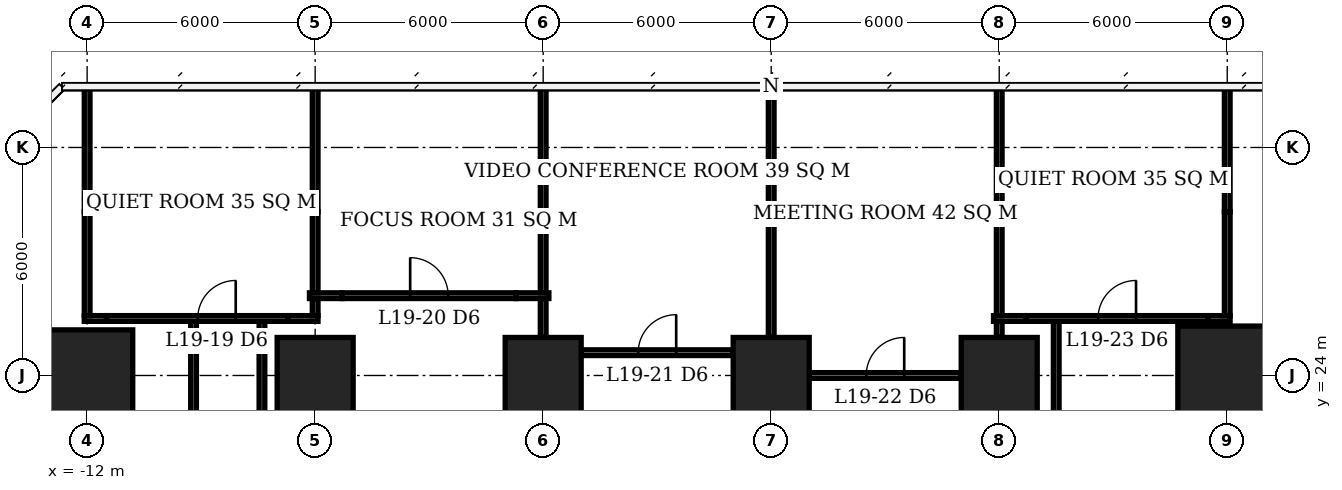
"""IFC4 building model, lengths in metres.
Left out: names, types, materials, properties, quantities, classifications, styles, units other than length and angle.
Written with IfcOpenShell. Run it as: python <this file> out.ifc"""

import sys

from ifc_helpers import new_model, si_unit, direction, frame, frame_2d, origin, origin_2d, place, context, subcontext, project, spatial, rectangle, extrude, element, fill, save


model = new_model("IFC4")
c1 = context("Model", 3, precision=1e-05, world=origin(), true_north=direction((0.0, 1.0)))
c2 = subcontext(c1, "Body", "Model", "MODEL_VIEW")
j1 = project(units=[si_unit("LENGTHUNIT", "METRE"), si_unit("PLANEANGLEUNIT", "RADIAN")], contexts=[c1])
p1 = place(None, origin())
s1 = spatial("IfcSite", under=j1, at=p1, CompositionType="ELEMENT")
p2 = place(p1, origin())
s2 = spatial("IfcBuilding", under=s1, at=p2, CompositionType="ELEMENT")
p3 = place(p2, frame((0.0, 0.0, 80.6)))
s3 = spatial("IfcBuildingStorey", under=s2, at=p3, CompositionType="ELEMENT", Elevation=80.6)
p4 = place(p3, frame((-12.0, 24.0, 0.0), z_axis=(0.0, 0.0, 1.0), x_axis=(1.0, 0.0, 0.0)))
e1 = element("IfcColumn", 1, at=p4, inside=s3, PredefinedType="COLUMN", context=c2, shape_type="SweptSolid", body=[
    extrude(rectangle(XDim=2.4, YDim=2.4, at=origin_2d()), origin(), (0.0, 0.0, 1.0), 3.9),
])
for number, where, z_axis, x_axis in (
    (2, (-6.0, 24.0, 0.0), (0.0, 0.0, 1.0), (1.0, 0.0, 0.0)),
    (3, (0.0, 24.0, 0.0), (0.0, 0.0, 1.0), (1.0, 0.0, 0.0)),
    (4, (6.0, 24.0, 0.0), (0.0, 0.0, 1.0), (1.0, 0.0, 0.0)),
    (5, (12.0, 24.0, 0.0), (0.0, 0.0, 1.0), (1.0, 0.0, 0.0)),
):
    element("IfcColumn", number, at=place(p3, frame(where, z_axis=z_axis, x_axis=x_axis)), inside=s3, PredefinedType="COLUMN", context=c2, shape_type="SweptSolid", body=[
        extrude(rectangle(XDim=2.0, YDim=2.0, at=origin_2d()), origin(), (0.0, 0.0, 1.0), 3.9),
    ])
p5 = place(p3, frame((18.0, 24.0, 0.0), z_axis=(0.0, 0.0, 1.0), x_axis=(1.0, 0.0, 0.0)))
e6 = element("IfcColumn", 6, at=p5, inside=s3, PredefinedType="COLUMN", context=c2, shape_type="SweptSolid", body=[
    extrude(rectangle(XDim=2.6, YDim=2.6, at=origin_2d()), origin(), (0.0, 0.0, 1.0), 3.9),
])
p6 = place(p3, frame((7.0, 24.0, 0.0), z_axis=(0.0, 0.0, 1.0), x_axis=(1.0, 0.0, 0.0)))
e7 = element("IfcWall", 7, at=p6, inside=s3, PredefinedType="PARTITIONING", context=c2, shape_type="SweptSolid", body=[
    extrude(rectangle(XDim=4.0, YDim=0.15, at=frame_2d((2.0, 0.0))), origin(), (0.0, 0.0, 1.0), 3.65),
])
p7 = place(p6, frame((1.5, 0.0, 0.0)))
e8 = element("IfcOpeningElement", 8, at=p7, cuts=e7, PredefinedType="OPENING", context=c2, shape_type="SweptSolid", body=[
    extrude(rectangle(XDim=1.0, YDim=2.1, at=frame_2d((0.5, 1.05))), frame((0.0, 0.085, 0.0), z_axis=(0.0, -1.0, 0.0), x_axis=(1.0, 0.0, 0.0)), (0.0, 0.0, 1.0), 0.17),
])
p8 = place(p3, frame((1.0, 24.6, 0.0), z_axis=(0.0, 0.0, 1.0), x_axis=(1.0, 0.0, 0.0)))
e9 = element("IfcWall", 9, at=p8, inside=s3, PredefinedType="PARTITIONING", context=c2, shape_type="SweptSolid", body=[
    extrude(rectangle(XDim=4.0, YDim=0.15, at=frame_2d((2.0, 0.0))), origin(), (0.0, 0.0, 1.0), 3.65),
])
p9 = place(p8, frame((1.5, 0.0, 0.0)))
e10 = element("IfcOpeningElement", 10, at=p9, cuts=e9, PredefinedType="OPENING", context=c2, shape_type="SweptSolid", body=[
    extrude(rectangle(XDim=1.0, YDim=2.1, at=frame_2d((0.5, 1.05))), frame((0.0, 0.085, 0.0), z_axis=(0.0, -1.0, 0.0), x_axis=(1.0, 0.0, 0.0)), (0.0, 0.0, 1.0), 0.17),
])
p10 = place(p3, frame((-12.075, 25.5, 0.0), z_axis=(0.0, 0.0, 1.0), x_axis=(1.0, 0.0, 0.0)))
e11 = element("IfcWall", 11, at=p10, inside=s3, PredefinedType="PARTITIONING", context=c2, shape_type="SweptSolid", body=[
    extrude(rectangle(XDim=0.585, YDim=0.15, at=frame_2d((0.292, 0.0))), origin(), (0.0, 0.0, 1.0), 2.65),
])
p11 = place(p3, frame((-11.49, 25.5, 0.0), z_axis=(0.0, 0.0, 1.0), x_axis=(1.0, 0.0, 0.0)))
e12 = element("IfcWall", 12, at=p11, inside=s3, PredefinedType="PARTITIONING", context=c2, shape_type="SweptSolid", body=[
    extrude(rectangle(XDim=4.78, YDim=0.15, at=frame_2d((2.39, 0.0))), origin(), (0.0, 0.0, 1.0), 3.65),
])
p12 = place(p11, frame((2.4, 0.0, 0.0)))
e13 = element("IfcOpeningElement", 13, at=p12, cuts=e12, PredefinedType="OPENING", context=c2, shape_type="SweptSolid", body=[
    extrude(rectangle(XDim=1.0, YDim=2.1, at=frame_2d((0.5, 1.05))), frame((0.0, 0.085, 0.0), z_axis=(0.0, -1.0, 0.0), x_axis=(1.0, 0.0, 0.0)), (0.0, 0.0, 1.0), 0.17),
])
p13 = place(p3, frame((-6.71, 25.5, 0.0), z_axis=(0.0, 0.0, 1.0), x_axis=(1.0, 0.0, 0.0)))
e14 = element("IfcWall", 14, at=p13, inside=s3, PredefinedType="PARTITIONING", context=c2, shape_type="SweptSolid", body=[
    extrude(rectangle(XDim=0.785, YDim=0.15, at=frame_2d((0.393, 0.0))), origin(), (0.0, 0.0, 1.0), 2.65),
])
p14 = place(p3, frame((11.85, 25.5, 0.0), z_axis=(0.0, 0.0, 1.0), x_axis=(1.0, 0.0, 0.0)))
e15 = element("IfcWall", 15, at=p14, inside=s3, PredefinedType="PARTITIONING", context=c2, shape_type="SweptSolid", body=[
    extrude(rectangle(XDim=0.86, YDim=0.15, at=frame_2d((0.43, 0.0))), origin(), (0.0, 0.0, 1.0), 2.65),
])
p15 = place(p3, frame((12.71, 25.5, 0.0), z_axis=(0.0, 0.0, 1.0), x_axis=(1.0, 0.0, 0.0)))
e16 = element("IfcWall", 16, at=p15, inside=s3, PredefinedType="PARTITIONING", context=c2, shape_type="SweptSolid", body=[
    extrude(rectangle(XDim=4.78, YDim=0.15, at=frame_2d((2.39, 0.0))), origin(), (0.0, 0.0, 1.0), 3.65),
])
p16 = place(p15, frame((1.89, 0.0, 0.0)))
e17 = element("IfcOpeningElement", 17, at=p16, cuts=e16, PredefinedType="OPENING", context=c2, shape_type="SweptSolid", body=[
    extrude(rectangle(XDim=1.0, YDim=2.1, at=frame_2d((0.5, 1.05))), frame((0.0, 0.085, 0.0), z_axis=(0.0, -1.0, 0.0), x_axis=(1.0, 0.0, 0.0)), (0.0, 0.0, 1.0), 0.17),
])
p17 = place(p3, frame((17.49, 25.5, 0.0), z_axis=(0.0, 0.0, 1.0), x_axis=(1.0, 0.0, 0.0)))
e18 = element("IfcWall", 18, at=p17, inside=s3, PredefinedType="PARTITIONING", context=c2, shape_type="SweptSolid", body=[
    extrude(rectangle(XDim=0.585, YDim=0.15, at=frame_2d((0.292, 0.0))), origin(), (0.0, 0.0, 1.0), 2.65),
])
p18 = place(p3, frame((-6.15, 26.1, 0.0), z_axis=(0.0, 0.0, 1.0), x_axis=(1.0, 0.0, 0.0)))
e19 = element("IfcWall", 19, at=p18, inside=s3, PredefinedType="PARTITIONING", context=c2, shape_type="SweptSolid", body=[
    extrude(rectangle(XDim=0.86, YDim=0.15, at=frame_2d((0.43, 0.0))), origin(), (0.0, 0.0, 1.0), 2.65),
])
p19 = place(p3, frame((-5.29, 26.1, 0.0), z_axis=(0.0, 0.0, 1.0), x_axis=(1.0, 0.0, 0.0)))
e20 = element("IfcWall", 20, at=p19, inside=s3, PredefinedType="PARTITIONING", context=c2, shape_type="SweptSolid", body=[
    extrude(rectangle(XDim=4.58, YDim=0.15, at=frame_2d((2.29, 0.0))), origin(), (0.0, 0.0, 1.0), 3.65),
])
p20 = place(p19, frame((1.79, 0.0, 0.0)))
e21 = element("IfcOpeningElement", 21, at=p20, cuts=e20, PredefinedType="OPENING", context=c2, shape_type="SweptSolid", body=[
    extrude(rectangle(XDim=1.0, YDim=2.1, at=frame_2d((0.5, 1.05))), frame((0.0, 0.085, 0.0), z_axis=(0.0, -1.0, 0.0), x_axis=(1.0, 0.0, 0.0)), (0.0, 0.0, 1.0), 0.17),
])
p21 = place(p3, frame((-0.71, 26.1, 0.0), z_axis=(0.0, 0.0, 1.0), x_axis=(1.0, 0.0, 0.0)))
e22 = element("IfcWall", 22, at=p21, inside=s3, PredefinedType="PARTITIONING", context=c2, shape_type="SweptSolid", body=[
    extrude(rectangle(XDim=0.86, YDim=0.15, at=frame_2d((0.43, 0.0))), origin(), (0.0, 0.0, 1.0), 2.65),
])
p22 = place(p3, frame((-12.0, 25.575, 0.0), z_axis=(0.0, 0.0, 1.0), x_axis=(0.0, 1.0, 0.0)))
e23 = element("IfcWall", 23, at=p22, inside=s3, PredefinedType="PARTITIONING", context=c2, shape_type="SweptSolid", body=[
    extrude(rectangle(XDim=2.735, YDim=0.15, at=frame_2d((1.368, 0.0))), origin(), (0.0, 0.0, 1.0), 2.65),
])
p23 = place(p3, frame((-12.0, 28.31, 0.0), z_axis=(0.0, 0.0, 1.0), x_axis=(0.0, 1.0, 0.0)))
e24 = element("IfcWall", 24, at=p23, inside=s3, PredefinedType="PARTITIONING", context=c2, shape_type="SweptSolid", body=[
    extrude(rectangle(XDim=3.29, YDim=0.15, at=frame_2d((1.645, 0.0))), origin(), (0.0, 0.0, 1.0), 3.65),
])
p24 = place(p3, frame((-6.0, 25.575, 0.0), z_axis=(0.0, 0.0, 1.0), x_axis=(0.0, 1.0, 0.0)))
e25 = element("IfcWall", 25, at=p24, inside=s3, PredefinedType="PARTITIONING", context=c2, shape_type="SweptSolid", body=[
    extrude(rectangle(XDim=0.45, YDim=0.15, at=frame_2d((0.225, 0.0))), origin(), (0.0, 0.0, 1.0), 2.65),
])
p25 = place(p3, frame((-6.0, 26.175, 0.0), z_axis=(0.0, 0.0, 1.0), x_axis=(0.0, 1.0, 0.0)))
e26 = element("IfcWall", 26, at=p25, inside=s3, PredefinedType="PARTITIONING", context=c2, shape_type="SweptSolid", body=[
    extrude(rectangle(XDim=2.135, YDim=0.15, at=frame_2d((1.067, 0.0))), origin(), (0.0, 0.0, 1.0), 2.65),
])
p26 = place(p3, frame((-6.0, 28.31, 0.0), z_axis=(0.0, 0.0, 1.0), x_axis=(0.0, 1.0, 0.0)))
e27 = element("IfcWall", 27, at=p26, inside=s3, PredefinedType="PARTITIONING", context=c2, shape_type="SweptSolid", body=[
    extrude(rectangle(XDim=3.29, YDim=0.15, at=frame_2d((1.645, 0.0))), origin(), (0.0, 0.0, 1.0), 3.65),
])
p27 = place(p3, frame((0.0, 25.0, 0.0), z_axis=(0.0, 0.0, 1.0), x_axis=(0.0, 1.0, 0.0)))
e28 = element("IfcWall", 28, at=p27, inside=s3, PredefinedType="PARTITIONING", context=c2, shape_type="SweptSolid", body=[
    extrude(rectangle(XDim=1.025, YDim=0.15, at=frame_2d((0.512, 0.0))), origin(), (0.0, 0.0, 1.0), 2.65),
])
p28 = place(p3, frame((0.0, 26.175, 0.0), z_axis=(0.0, 0.0, 1.0), x_axis=(0.0, 1.0, 0.0)))
e29 = element("IfcWall", 29, at=p28, inside=s3, PredefinedType="PARTITIONING", context=c2, shape_type="SweptSolid", body=[
    extrude(rectangle(XDim=2.135, YDim=0.15, at=frame_2d((1.067, 0.0))), origin(), (0.0, 0.0, 1.0), 2.65),
])
p29 = place(p3, frame((0.0, 28.31, 0.0), z_axis=(0.0, 0.0, 1.0), x_axis=(0.0, 1.0, 0.0)))
e30 = element("IfcWall", 30, at=p29, inside=s3, PredefinedType="PARTITIONING", context=c2, shape_type="SweptSolid", body=[
    extrude(rectangle(XDim=3.29, YDim=0.15, at=frame_2d((1.645, 0.0))), origin(), (0.0, 0.0, 1.0), 3.65),
])
p30 = place(p3, frame((6.0, 25.0, 0.0), z_axis=(0.0, 0.0, 1.0), x_axis=(0.0, 1.0, 0.0)))
e31 = element("IfcWall", 31, at=p30, inside=s3, PredefinedType="PARTITIONING", context=c2, shape_type="SweptSolid", body=[
    extrude(rectangle(XDim=3.31, YDim=0.15, at=frame_2d((1.655, 0.0))), origin(), (0.0, 0.0, 1.0), 2.65),
])
p31 = place(p3, frame((6.0, 28.31, 0.0), z_axis=(0.0, 0.0, 1.0), x_axis=(0.0, 1.0, 0.0)))
e32 = element("IfcWall", 32, at=p31, inside=s3, PredefinedType="PARTITIONING", context=c2, shape_type="SweptSolid", body=[
    extrude(rectangle(XDim=3.24, YDim=0.15, at=frame_2d((1.62, 0.0))), origin(), (0.0, 0.0, 1.0), 3.65),
])
p32 = place(p3, frame((12.0, 25.0, 0.0), z_axis=(0.0, 0.0, 1.0), x_axis=(0.0, 1.0, 0.0)))
e33 = element("IfcWall", 33, at=p32, inside=s3, PredefinedType="PARTITIONING", context=c2, shape_type="SweptSolid", body=[
    extrude(rectangle(XDim=0.425, YDim=0.15, at=frame_2d((0.212, 0.0))), origin(), (0.0, 0.0, 1.0), 2.65),
])
p33 = place(p3, frame((12.0, 25.575, 0.0), z_axis=(0.0, 0.0, 1.0), x_axis=(0.0, 1.0, 0.0)))
e34 = element("IfcWall", 34, at=p33, inside=s3, PredefinedType="PARTITIONING", context=c2, shape_type="SweptSolid", body=[
    extrude(rectangle(XDim=2.735, YDim=0.15, at=frame_2d((1.368, 0.0))), origin(), (0.0, 0.0, 1.0), 2.65),
])
p34 = place(p3, frame((12.0, 28.31, 0.0), z_axis=(0.0, 0.0, 1.0), x_axis=(0.0, 1.0, 0.0)))
e35 = element("IfcWall", 35, at=p34, inside=s3, PredefinedType="PARTITIONING", context=c2, shape_type="SweptSolid", body=[
    extrude(rectangle(XDim=3.29, YDim=0.15, at=frame_2d((1.645, 0.0))), origin(), (0.0, 0.0, 1.0), 3.65),
])
p35 = place(p3, frame((18.0, 25.575, 0.0), z_axis=(0.0, 0.0, 1.0), x_axis=(0.0, 1.0, 0.0)))
e36 = element("IfcWall", 36, at=p35, inside=s3, PredefinedType="PARTITIONING", context=c2, shape_type="SweptSolid", body=[
    extrude(rectangle(XDim=2.735, YDim=0.15, at=frame_2d((1.368, 0.0))), origin(), (0.0, 0.0, 1.0), 2.65),
])
p36 = place(p3, frame((18.0, 28.31, 0.0), z_axis=(0.0, 0.0, 1.0), x_axis=(0.0, 1.0, 0.0)))
e37 = element("IfcWall", 37, at=p36, inside=s3, PredefinedType="PARTITIONING", context=c2, shape_type="SweptSolid", body=[
    extrude(rectangle(XDim=3.29, YDim=0.15, at=frame_2d((1.645, 0.0))), origin(), (0.0, 0.0, 1.0), 3.65),
])
p37 = place(p3, frame((-9.2, 16.575, 0.0), z_axis=(0.0, 0.0, 1.0), x_axis=(0.0, 1.0, 0.0)))
e38 = element("IfcWall", 38, at=p37, inside=s3, PredefinedType="PARTITIONING", context=c2, shape_type="SweptSolid", body=[
    extrude(rectangle(XDim=8.85, YDim=0.15, at=frame_2d((4.425, 0.0))), origin(), (0.0, 0.0, 1.0), 3.65),
])
p38 = place(p37, frame((2.549, 0.0, 0.0)))
e39 = element("IfcOpeningElement", 39, at=p38, cuts=e38, PredefinedType="OPENING", context=c2, shape_type="SweptSolid", body=[
    extrude(rectangle(XDim=1.0, YDim=2.1, at=frame_2d((0.5, 1.05))), frame((0.0, 0.085, 0.0), z_axis=(0.0, -1.0, 0.0), x_axis=(1.0, 0.0, 0.0)), (0.0, 0.0, 1.0), 0.17),
])
p39 = place(p3, frame((-7.4, 16.0, 0.0), z_axis=(0.0, 0.0, 1.0), x_axis=(0.0, 1.0, 0.0)))
e40 = element("IfcWall", 40, at=p39, inside=s3, PredefinedType="PARTITIONING", context=c2, shape_type="SweptSolid", body=[
    extrude(rectangle(XDim=9.425, YDim=0.15, at=frame_2d((4.712, 0.0))), origin(), (0.0, 0.0, 1.0), 3.65),
])
p40 = place(p39, frame((5.626, 0.0, 0.0)))
e41 = element("IfcOpeningElement", 41, at=p40, cuts=e40, PredefinedType="OPENING", context=c2, shape_type="SweptSolid", body=[
    extrude(rectangle(XDim=1.0, YDim=2.1, at=frame_2d((0.5, 1.05))), frame((0.0, 0.085, 0.0), z_axis=(0.0, -1.0, 0.0), x_axis=(1.0, 0.0, 0.0)), (0.0, 0.0, 1.0), 0.17),
])
p41 = place(p3, frame((13.5, 13.6, 0.0), z_axis=(0.0, 0.0, 1.0), x_axis=(0.0, 1.0, 0.0)))
e42 = element("IfcWall", 42, at=p41, inside=s3, PredefinedType="PARTITIONING", context=c2, shape_type="SweptSolid", body=[
    extrude(rectangle(XDim=11.825, YDim=0.15, at=frame_2d((5.913, 0.0))), origin(), (0.0, 0.0, 1.0), 3.65),
])
p42 = place(p12, origin())
e43 = element("IfcDoor", 43, at=p42, inside=s3, OperationType="SINGLE_SWING_RIGHT", PredefinedType="DOOR", context=c2, shape_type="SweptSolid", body=[
    extrude(rectangle(XDim=1.0, YDim=2.1, at=frame_2d((0.5, 1.05))), frame((0.0, 0.025, 0.0), z_axis=(0.0, -1.0, 0.0), x_axis=(1.0, 0.0, 0.0)), (0.0, 0.0, 1.0), 0.05),
])
fill(e13, e43)
p43 = place(p20, origin())
e44 = element("IfcDoor", 44, at=p43, inside=s3, OperationType="SINGLE_SWING_LEFT", PredefinedType="DOOR", context=c2, shape_type="SweptSolid", body=[
    extrude(rectangle(XDim=1.0, YDim=2.1, at=frame_2d((0.5, 1.05))), frame((0.0, 0.025, 0.0), z_axis=(0.0, -1.0, 0.0), x_axis=(1.0, 0.0, 0.0)), (0.0, 0.0, 1.0), 0.05),
])
fill(e21, e44)
p44 = place(p9, origin())
e45 = element("IfcDoor", 45, at=p44, inside=s3, OperationType="SINGLE_SWING_RIGHT", PredefinedType="DOOR", context=c2, shape_type="SweptSolid", body=[
    extrude(rectangle(XDim=1.0, YDim=2.1, at=frame_2d((0.5, 1.05))), frame((0.0, 0.025, 0.0), z_axis=(0.0, -1.0, 0.0), x_axis=(1.0, 0.0, 0.0)), (0.0, 0.0, 1.0), 0.05),
])
fill(e10, e45)
p45 = place(p7, origin())
e46 = element("IfcDoor", 46, at=p45, inside=s3, OperationType="SINGLE_SWING_RIGHT", PredefinedType="DOOR", context=c2, shape_type="SweptSolid", body=[
    extrude(rectangle(XDim=1.0, YDim=2.1, at=frame_2d((0.5, 1.05))), frame((0.0, 0.025, 0.0), z_axis=(0.0, -1.0, 0.0), x_axis=(1.0, 0.0, 0.0)), (0.0, 0.0, 1.0), 0.05),
])
fill(e8, e46)
p46 = place(p16, origin())
e47 = element("IfcDoor", 47, at=p46, inside=s3, OperationType="SINGLE_SWING_RIGHT", PredefinedType="DOOR", context=c2, shape_type="SweptSolid", body=[
    extrude(rectangle(XDim=1.0, YDim=2.1, at=frame_2d((0.5, 1.05))), frame((0.0, 0.025, 0.0), z_axis=(0.0, -1.0, 0.0), x_axis=(1.0, 0.0, 0.0)), (0.0, 0.0, 1.0), 0.05),
])
fill(e17, e47)
save(model, sys.argv[1])
